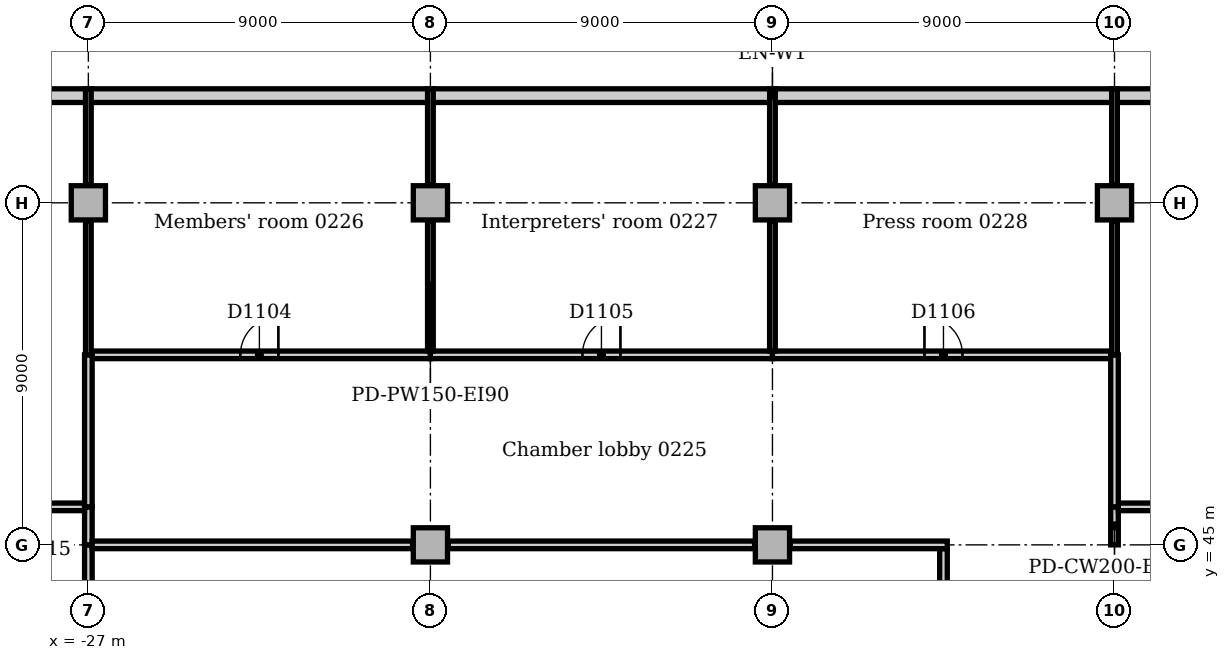
"""IFC4 building model, lengths in metres.
Left out: names, types, materials, properties, quantities, classifications, styles, units other than length and angle.
Written with IfcOpenShell. Run it as: python <this file> out.ifc"""

import sys

from ifc_helpers import new_model, si_unit, direction, frame, frame_2d, origin, origin_2d, place, context, subcontext, project, spatial, rectangle, extrude, element, fill, save


model = new_model("IFC4")
c1 = context("Model", 3, precision=1e-05, world=origin(), true_north=direction((0.0, 1.0)))
c2 = subcontext(c1, "Body", "Model", "MODEL_VIEW")
j1 = project(units=[si_unit("LENGTHUNIT", "METRE"), si_unit("PLANEANGLEUNIT", "RADIAN")], contexts=[c1])
p1 = place(None, origin())
s1 = spatial("IfcSite", under=j1, at=p1, CompositionType="ELEMENT")
p2 = place(p1, origin())
s2 = spatial("IfcBuilding", under=s1, at=p2, CompositionType="ELEMENT")
p3 = place(p2, frame((0.0, 0.0, 11.0)))
s3 = spatial("IfcBuildingStorey", under=s2, at=p3, CompositionType="ELEMENT", Elevation=11.0)
for number, where, z_axis, x_axis in (
    (1, (-27.0, 54.0, 0.0), (0.0, 0.0, 1.0), (1.0, 0.0, 0.0)),
    (2, (-18.0, 45.0, 0.0), (0.0, 0.0, 1.0), (1.0, 0.0, 0.0)),
    (3, (-18.0, 54.0, 0.0), (0.0, 0.0, 1.0), (1.0, 0.0, 0.0)),
    (4, (-9.0, 45.0, 0.0), (0.0, 0.0, 1.0), (1.0, 0.0, 0.0)),
    (5, (-9.0, 54.0, 0.0), (0.0, 0.0, 1.0), (1.0, 0.0, 0.0)),
    (6, (0.0, 54.0, 0.0), (0.0, 0.0, 1.0), (1.0, 0.0, 0.0)),
):
    element("IfcColumn", number, at=place(p3, frame(where, z_axis=z_axis, x_axis=x_axis)), inside=s3, PredefinedType="COLUMN", context=c2, shape_type="SweptSolid", body=[
        extrude(rectangle(XDim=0.9, YDim=0.9, at=origin_2d()), origin(), (0.0, 0.0, 1.0), 4.7),
    ])
p4 = place(p3, frame((63.0, 56.82, 0.0), z_axis=(0.0, 0.0, 1.0), x_axis=(-1.0, 0.0, 0.0)))
e7 = element("IfcWall", 7, at=p4, inside=s3, PredefinedType="STANDARD", context=c2, shape_type="SweptSolid", body=[
    extrude(rectangle(XDim=144.0, YDim=0.36, at=frame_2d((72.0, 0.0))), origin(), (0.0, 0.0, 1.0), 4.7),
])
p5 = place(p4, frame((2.85, 0.0, 0.9)))
e8 = element("IfcOpeningElement", 8, at=p5, cuts=e7, PredefinedType="OPENING", context=c2, shape_type="SweptSolid", body=[
    extrude(rectangle(XDim=3.3, YDim=2.4, at=frame_2d((1.65, 1.2))), frame((0.0, 0.19, 0.0), z_axis=(0.0, -1.0, 0.0), x_axis=(1.0, 0.0, 0.0)), (0.0, 0.0, 1.0), 0.38),
])
p6 = place(p4, frame((7.35, 0.0, 0.9)))
e9 = element("IfcOpeningElement", 9, at=p6, cuts=e7, PredefinedType="OPENING", context=c2, shape_type="SweptSolid", body=[
    extrude(rectangle(XDim=3.3, YDim=2.4, at=frame_2d((1.65, 1.2))), frame((0.0, 0.19, 0.0), z_axis=(0.0, -1.0, 0.0), x_axis=(1.0, 0.0, 0.0)), (0.0, 0.0, 1.0), 0.38),
])
p7 = place(p4, frame((11.85, 0.0, 0.9)))
e10 = element("IfcOpeningElement", 10, at=p7, cuts=e7, PredefinedType="OPENING", context=c2, shape_type="SweptSolid", body=[
    extrude(rectangle(XDim=3.3, YDim=2.4, at=frame_2d((1.65, 1.2))), frame((0.0, 0.19, 0.0), z_axis=(0.0, -1.0, 0.0), x_axis=(1.0, 0.0, 0.0)), (0.0, 0.0, 1.0), 0.38),
])
p8 = place(p4, frame((16.35, 0.0, 0.9)))
e11 = element("IfcOpeningElement", 11, at=p8, cuts=e7, PredefinedType="OPENING", context=c2, shape_type="SweptSolid", body=[
    extrude(rectangle(XDim=3.3, YDim=2.4, at=frame_2d((1.65, 1.2))), frame((0.0, 0.19, 0.0), z_axis=(0.0, -1.0, 0.0), x_axis=(1.0, 0.0, 0.0)), (0.0, 0.0, 1.0), 0.38),
])
p9 = place(p4, frame((20.85, 0.0, 0.9)))
e12 = element("IfcOpeningElement", 12, at=p9, cuts=e7, PredefinedType="OPENING", context=c2, shape_type="SweptSolid", body=[
    extrude(rectangle(XDim=3.3, YDim=2.4, at=frame_2d((1.65, 1.2))), frame((0.0, 0.19, 0.0), z_axis=(0.0, -1.0, 0.0), x_axis=(1.0, 0.0, 0.0)), (0.0, 0.0, 1.0), 0.38),
])
p10 = place(p4, frame((25.35, 0.0, 0.9)))
e13 = element("IfcOpeningElement", 13, at=p10, cuts=e7, PredefinedType="OPENING", context=c2, shape_type="SweptSolid", body=[
    extrude(rectangle(XDim=3.3, YDim=2.4, at=frame_2d((1.65, 1.2))), frame((0.0, 0.19, 0.0), z_axis=(0.0, -1.0, 0.0), x_axis=(1.0, 0.0, 0.0)), (0.0, 0.0, 1.0), 0.38),
])
p11 = place(p4, frame((29.85, 0.0, 0.9)))
e14 = element("IfcOpeningElement", 14, at=p11, cuts=e7, PredefinedType="OPENING", context=c2, shape_type="SweptSolid", body=[
    extrude(rectangle(XDim=3.3, YDim=2.4, at=frame_2d((1.65, 1.2))), frame((0.0, 0.19, 0.0), z_axis=(0.0, -1.0, 0.0), x_axis=(1.0, 0.0, 0.0)), (0.0, 0.0, 1.0), 0.38),
])
p12 = place(p4, frame((34.35, 0.0, 0.9)))
e15 = element("IfcOpeningElement", 15, at=p12, cuts=e7, PredefinedType="OPENING", context=c2, shape_type="SweptSolid", body=[
    extrude(rectangle(XDim=3.3, YDim=2.4, at=frame_2d((1.65, 1.2))), frame((0.0, 0.19, 0.0), z_axis=(0.0, -1.0, 0.0), x_axis=(1.0, 0.0, 0.0)), (0.0, 0.0, 1.0), 0.38),
])
p13 = place(p4, frame((38.85, 0.0, 0.9)))
e16 = element("IfcOpeningElement", 16, at=p13, cuts=e7, PredefinedType="OPENING", context=c2, shape_type="SweptSolid", body=[
    extrude(rectangle(XDim=3.3, YDim=2.4, at=frame_2d((1.65, 1.2))), frame((0.0, 0.19, 0.0), z_axis=(0.0, -1.0, 0.0), x_axis=(1.0, 0.0, 0.0)), (0.0, 0.0, 1.0), 0.38),
])
p14 = place(p4, frame((43.35, 0.0, 0.9)))
e17 = element("IfcOpeningElement", 17, at=p14, cuts=e7, PredefinedType="OPENING", context=c2, shape_type="SweptSolid", body=[
    extrude(rectangle(XDim=3.3, YDim=2.4, at=frame_2d((1.65, 1.2))), frame((0.0, 0.19, 0.0), z_axis=(0.0, -1.0, 0.0), x_axis=(1.0, 0.0, 0.0)), (0.0, 0.0, 1.0), 0.38),
])
p15 = place(p4, frame((47.85, 0.0, 0.9)))
e18 = element("IfcOpeningElement", 18, at=p15, cuts=e7, PredefinedType="OPENING", context=c2, shape_type="SweptSolid", body=[
    extrude(rectangle(XDim=3.3, YDim=2.4, at=frame_2d((1.65, 1.2))), frame((0.0, 0.19, 0.0), z_axis=(0.0, -1.0, 0.0), x_axis=(1.0, 0.0, 0.0)), (0.0, 0.0, 1.0), 0.38),
])
p16 = place(p4, frame((52.35, 0.0, 0.9)))
e19 = element("IfcOpeningElement", 19, at=p16, cuts=e7, PredefinedType="OPENING", context=c2, shape_type="SweptSolid", body=[
    extrude(rectangle(XDim=3.3, YDim=2.4, at=frame_2d((1.65, 1.2))), frame((0.0, 0.19, 0.0), z_axis=(0.0, -1.0, 0.0), x_axis=(1.0, 0.0, 0.0)), (0.0, 0.0, 1.0), 0.38),
])
p17 = place(p4, frame((56.85, 0.0, 0.9)))
e20 = element("IfcOpeningElement", 20, at=p17, cuts=e7, PredefinedType="OPENING", context=c2, shape_type="SweptSolid", body=[
    extrude(rectangle(XDim=3.3, YDim=2.4, at=frame_2d((1.65, 1.2))), frame((0.0, 0.19, 0.0), z_axis=(0.0, -1.0, 0.0), x_axis=(1.0, 0.0, 0.0)), (0.0, 0.0, 1.0), 0.38),
])
p18 = place(p4, frame((92.85, 0.0, 0.9)))
e21 = element("IfcOpeningElement", 21, at=p18, cuts=e7, PredefinedType="OPENING", context=c2, shape_type="SweptSolid", body=[
    extrude(rectangle(XDim=3.3, YDim=2.4, at=frame_2d((1.65, 1.2))), frame((0.0, 0.19, 0.0), z_axis=(0.0, -1.0, 0.0), x_axis=(1.0, 0.0, 0.0)), (0.0, 0.0, 1.0), 0.38),
])
p19 = place(p4, frame((97.35, 0.0, 0.9)))
e22 = element("IfcOpeningElement", 22, at=p19, cuts=e7, PredefinedType="OPENING", context=c2, shape_type="SweptSolid", body=[
    extrude(rectangle(XDim=3.3, YDim=2.4, at=frame_2d((1.65, 1.2))), frame((0.0, 0.19, 0.0), z_axis=(0.0, -1.0, 0.0), x_axis=(1.0, 0.0, 0.0)), (0.0, 0.0, 1.0), 0.38),
])
p20 = place(p4, frame((101.85, 0.0, 0.9)))
e23 = element("IfcOpeningElement", 23, at=p20, cuts=e7, PredefinedType="OPENING", context=c2, shape_type="SweptSolid", body=[
    extrude(rectangle(XDim=3.3, YDim=2.4, at=frame_2d((1.65, 1.2))), frame((0.0, 0.19, 0.0), z_axis=(0.0, -1.0, 0.0), x_axis=(1.0, 0.0, 0.0)), (0.0, 0.0, 1.0), 0.38),
])
p21 = place(p4, frame((106.35, 0.0, 0.9)))
e24 = element("IfcOpeningElement", 24, at=p21, cuts=e7, PredefinedType="OPENING", context=c2, shape_type="SweptSolid", body=[
    extrude(rectangle(XDim=3.3, YDim=2.4, at=frame_2d((1.65, 1.2))), frame((0.0, 0.19, 0.0), z_axis=(0.0, -1.0, 0.0), x_axis=(1.0, 0.0, 0.0)), (0.0, 0.0, 1.0), 0.38),
])
p22 = place(p4, frame((110.85, 0.0, 0.9)))
e25 = element("IfcOpeningElement", 25, at=p22, cuts=e7, PredefinedType="OPENING", context=c2, shape_type="SweptSolid", body=[
    extrude(rectangle(XDim=3.3, YDim=2.4, at=frame_2d((1.65, 1.2))), frame((0.0, 0.19, 0.0), z_axis=(0.0, -1.0, 0.0), x_axis=(1.0, 0.0, 0.0)), (0.0, 0.0, 1.0), 0.38),
])
p23 = place(p4, frame((115.35, 0.0, 0.9)))
e26 = element("IfcOpeningElement", 26, at=p23, cuts=e7, PredefinedType="OPENING", context=c2, shape_type="SweptSolid", body=[
    extrude(rectangle(XDim=3.3, YDim=2.4, at=frame_2d((1.65, 1.2))), frame((0.0, 0.19, 0.0), z_axis=(0.0, -1.0, 0.0), x_axis=(1.0, 0.0, 0.0)), (0.0, 0.0, 1.0), 0.38),
])
p24 = place(p4, frame((119.85, 0.0, 0.9)))
e27 = element("IfcOpeningElement", 27, at=p24, cuts=e7, PredefinedType="OPENING", context=c2, shape_type="SweptSolid", body=[
    extrude(rectangle(XDim=3.3, YDim=2.4, at=frame_2d((1.65, 1.2))), frame((0.0, 0.19, 0.0), z_axis=(0.0, -1.0, 0.0), x_axis=(1.0, 0.0, 0.0)), (0.0, 0.0, 1.0), 0.38),
])
p25 = place(p4, frame((124.35, 0.0, 0.9)))
e28 = element("IfcOpeningElement", 28, at=p25, cuts=e7, PredefinedType="OPENING", context=c2, shape_type="SweptSolid", body=[
    extrude(rectangle(XDim=3.3, YDim=2.4, at=frame_2d((1.65, 1.2))), frame((0.0, 0.19, 0.0), z_axis=(0.0, -1.0, 0.0), x_axis=(1.0, 0.0, 0.0)), (0.0, 0.0, 1.0), 0.38),
])
p26 = place(p4, frame((128.85, 0.0, 0.9)))
e29 = element("IfcOpeningElement", 29, at=p26, cuts=e7, PredefinedType="OPENING", context=c2, shape_type="SweptSolid", body=[
    extrude(rectangle(XDim=3.3, YDim=2.4, at=frame_2d((1.65, 1.2))), frame((0.0, 0.19, 0.0), z_axis=(0.0, -1.0, 0.0), x_axis=(1.0, 0.0, 0.0)), (0.0, 0.0, 1.0), 0.38),
])
p27 = place(p4, frame((133.35, 0.0, 0.9)))
e30 = element("IfcOpeningElement", 30, at=p27, cuts=e7, PredefinedType="OPENING", context=c2, shape_type="SweptSolid", body=[
    extrude(rectangle(XDim=3.3, YDim=2.4, at=frame_2d((1.65, 1.2))), frame((0.0, 0.19, 0.0), z_axis=(0.0, -1.0, 0.0), x_axis=(1.0, 0.0, 0.0)), (0.0, 0.0, 1.0), 0.38),
])
p28 = place(p4, frame((137.85, 0.0, 0.9)))
e31 = element("IfcOpeningElement", 31, at=p28, cuts=e7, PredefinedType="OPENING", context=c2, shape_type="SweptSolid", body=[
    extrude(rectangle(XDim=3.3, YDim=2.4, at=frame_2d((1.65, 1.2))), frame((0.0, 0.19, 0.0), z_axis=(0.0, -1.0, 0.0), x_axis=(1.0, 0.0, 0.0)), (0.0, 0.0, 1.0), 0.38),
])
p29 = place(p3, frame((-27.0, 42.0, 0.0), z_axis=(0.0, 0.0, 1.0), x_axis=(0.0, 1.0, 0.0)))
e32 = element("IfcWall", 32, at=p29, inside=s3, PredefinedType="PARTITIONING", context=c2, shape_type="SweptSolid", body=[
    extrude(rectangle(XDim=3.0, YDim=0.2, at=frame_2d((1.5, 0.0))), origin(), (0.0, 0.0, 1.0), 4.7),
])
p30 = place(p3, frame((-27.0, 45.0, 0.0), z_axis=(0.0, 0.0, 1.0), x_axis=(0.0, 1.0, 0.0)))
e33 = element("IfcWall", 33, at=p30, inside=s3, PredefinedType="PARTITIONING", context=c2, shape_type="SweptSolid", body=[
    extrude(rectangle(XDim=1.0, YDim=0.2, at=frame_2d((0.5, 0.0))), origin(), (0.0, 0.0, 1.0), 4.7),
])
p31 = place(p3, frame((-36.0, 46.0, 0.0), z_axis=(0.0, 0.0, 1.0), x_axis=(1.0, 0.0, 0.0)))
e34 = element("IfcWall", 34, at=p31, inside=s3, PredefinedType="PARTITIONING", context=c2, shape_type="SweptSolid", body=[
    extrude(rectangle(XDim=8.9, YDim=0.2, at=frame_2d((4.45, 0.0))), origin(), (0.0, 0.0, 1.0), 4.7),
])
p32 = place(p31, frame((4.0, 0.0, 0.0)))
e35 = element("IfcOpeningElement", 35, at=p32, cuts=e34, PredefinedType="OPENING", context=c2, shape_type="SweptSolid", body=[
    extrude(rectangle(XDim=1.0, YDim=2.1, at=frame_2d((0.5, 1.05))), frame((0.0, 0.11, 0.0), z_axis=(0.0, -1.0, 0.0), x_axis=(1.0, 0.0, 0.0)), (0.0, 0.0, 1.0), 0.22),
])
p33 = place(p3, frame((0.0, 45.0, 0.0), z_axis=(0.0, 0.0, 1.0), x_axis=(0.0, 1.0, 0.0)))
e36 = element("IfcWall", 36, at=p33, inside=s3, PredefinedType="PARTITIONING", context=c2, shape_type="SweptSolid", body=[
    extrude(rectangle(XDim=1.0, YDim=0.2, at=frame_2d((0.5, 0.0))), origin(), (0.0, 0.0, 1.0), 4.7),
])
p34 = place(p3, frame((0.1, 46.0, 0.0), z_axis=(0.0, 0.0, 1.0), x_axis=(1.0, 0.0, 0.0)))
e37 = element("IfcWall", 37, at=p34, inside=s3, PredefinedType="PARTITIONING", context=c2, shape_type="SweptSolid", body=[
    extrude(rectangle(XDim=8.9, YDim=0.2, at=frame_2d((4.45, 0.0))), origin(), (0.0, 0.0, 1.0), 4.7),
])
p35 = place(p34, frame((3.9, 0.0, 0.0)))
e38 = element("IfcOpeningElement", 38, at=p35, cuts=e37, PredefinedType="OPENING", context=c2, shape_type="SweptSolid", body=[
    extrude(rectangle(XDim=1.0, YDim=2.1, at=frame_2d((0.5, 1.05))), frame((0.0, 0.11, 0.0), z_axis=(0.0, -1.0, 0.0), x_axis=(1.0, 0.0, 0.0)), (0.0, 0.0, 1.0), 0.22),
])
p36 = place(p3, frame((-4.5, 21.0, 0.0), z_axis=(0.0, 0.0, 1.0), x_axis=(0.0, 1.0, 0.0)))
e39 = element("IfcWall", 39, at=p36, inside=s3, PredefinedType="PARTITIONING", context=c2, shape_type="SweptSolid", body=[
    extrude(rectangle(XDim=23.9, YDim=0.2, at=frame_2d((11.95, 0.0))), origin(), (0.0, 0.0, 1.0), 4.7),
])
p37 = place(p3, frame((-26.9, 45.0, 0.0), z_axis=(0.0, 0.0, 1.0), x_axis=(1.0, 0.0, 0.0)))
e40 = element("IfcWall", 40, at=p37, inside=s3, PredefinedType="PARTITIONING", context=c2, shape_type="SweptSolid", body=[
    extrude(rectangle(XDim=8.43, YDim=0.2, at=frame_2d((4.215, 0.0))), origin(), (0.0, 0.0, 1.0), 4.7),
])
p38 = place(p3, frame((-17.53, 45.0, 0.0), z_axis=(0.0, 0.0, 1.0), x_axis=(1.0, 0.0, 0.0)))
e41 = element("IfcWall", 41, at=p38, inside=s3, PredefinedType="PARTITIONING", context=c2, shape_type="SweptSolid", body=[
    extrude(rectangle(XDim=8.06, YDim=0.2, at=frame_2d((4.03, 0.0))), origin(), (0.0, 0.0, 1.0), 4.7),
])
p39 = place(p3, frame((-8.53, 45.0, 0.0), z_axis=(0.0, 0.0, 1.0), x_axis=(1.0, 0.0, 0.0)))
e42 = element("IfcWall", 42, at=p39, inside=s3, PredefinedType="PARTITIONING", context=c2, shape_type="SweptSolid", body=[
    extrude(rectangle(XDim=4.13, YDim=0.2, at=frame_2d((2.065, 0.0))), origin(), (0.0, 0.0, 1.0), 4.7),
])
p40 = place(p3, frame((-26.9, 50.0, 0.0), z_axis=(0.0, 0.0, 1.0), x_axis=(1.0, 0.0, 0.0)))
e43 = element("IfcWall", 43, at=p40, inside=s3, PredefinedType="PARTITIONING", context=c2, shape_type="SweptSolid", body=[
    extrude(rectangle(XDim=8.9, YDim=0.2, at=frame_2d((4.45, 0.0))), origin(), (0.0, 0.0, 1.0), 4.7),
])
p41 = place(p40, frame((3.9, 0.0, 0.0)))
e44 = element("IfcOpeningElement", 44, at=p41, cuts=e43, PredefinedType="OPENING", context=c2, shape_type="SweptSolid", body=[
    extrude(rectangle(XDim=1.0, YDim=2.1, at=frame_2d((0.5, 1.05))), frame((0.0, 0.11, 0.0), z_axis=(0.0, -1.0, 0.0), x_axis=(1.0, 0.0, 0.0)), (0.0, 0.0, 1.0), 0.22),
])
p42 = place(p3, frame((-18.0, 50.0, 0.0), z_axis=(0.0, 0.0, 1.0), x_axis=(1.0, 0.0, 0.0)))
e45 = element("IfcWall", 45, at=p42, inside=s3, PredefinedType="PARTITIONING", context=c2, shape_type="SweptSolid", body=[
    extrude(rectangle(XDim=9.0, YDim=0.2, at=frame_2d((4.5, 0.0))), origin(), (0.0, 0.0, 1.0), 4.7),
])
p43 = place(p42, frame((4.0, 0.0, 0.0)))
e46 = element("IfcOpeningElement", 46, at=p43, cuts=e45, PredefinedType="OPENING", context=c2, shape_type="SweptSolid", body=[
    extrude(rectangle(XDim=1.0, YDim=2.1, at=frame_2d((0.5, 1.05))), frame((0.0, 0.11, 0.0), z_axis=(0.0, -1.0, 0.0), x_axis=(1.0, 0.0, 0.0)), (0.0, 0.0, 1.0), 0.22),
])
p44 = place(p3, frame((-9.0, 50.0, 0.0), z_axis=(0.0, 0.0, 1.0), x_axis=(1.0, 0.0, 0.0)))
e47 = element("IfcWall", 47, at=p44, inside=s3, PredefinedType="PARTITIONING", context=c2, shape_type="SweptSolid", body=[
    extrude(rectangle(XDim=8.9, YDim=0.2, at=frame_2d((4.45, 0.0))), origin(), (0.0, 0.0, 1.0), 4.7),
])
p45 = place(p44, frame((4.0, 0.0, 0.0)))
e48 = element("IfcOpeningElement", 48, at=p45, cuts=e47, PredefinedType="OPENING", context=c2, shape_type="SweptSolid", body=[
    extrude(rectangle(XDim=1.0, YDim=2.1, at=frame_2d((0.5, 1.05))), frame((0.0, 0.11, 0.0), z_axis=(0.0, -1.0, 0.0), x_axis=(1.0, 0.0, 0.0)), (0.0, 0.0, 1.0), 0.22),
])
for number, where, z_axis, x_axis in (
    (49, (-27.0, 46.0, 0.0), (0.0, 0.0, 1.0), (0.0, 1.0, 0.0)),
    (50, (0.0, 46.0, 0.0), (0.0, 0.0, 1.0), (0.0, 1.0, 0.0)),
):
    element("IfcWall", number, at=place(p3, frame(where, z_axis=z_axis, x_axis=x_axis)), inside=s3, PredefinedType="PARTITIONING", context=c2, shape_type="SweptSolid", body=[
        extrude(rectangle(XDim=4.0, YDim=0.2, at=frame_2d((2.0, 0.0))), origin(), (0.0, 0.0, 1.0), 4.7),
    ])
p46 = place(p3, frame((-18.0, 50.1, 0.0), z_axis=(0.0, 0.0, 1.0), x_axis=(0.0, 1.0, 0.0)))
e51 = element("IfcWall", 51, at=p46, inside=s3, PredefinedType="PARTITIONING", context=c2, shape_type="SweptSolid", body=[
    extrude(rectangle(XDim=3.43, YDim=0.15, at=frame_2d((1.715, 0.0))), origin(), (0.0, 0.0, 1.0), 4.7),
])
p47 = place(p3, frame((-18.0, 54.47, 0.0), z_axis=(0.0, 0.0, 1.0), x_axis=(0.0, 1.0, 0.0)))
e52 = element("IfcWall", 52, at=p47, inside=s3, PredefinedType="PARTITIONING", context=c2, shape_type="SweptSolid", body=[
    extrude(rectangle(XDim=2.53, YDim=0.15, at=frame_2d((1.265, 0.0))), origin(), (0.0, 0.0, 1.0), 4.7),
])
p48 = place(p3, frame((-27.0, 50.0, 0.0), z_axis=(0.0, 0.0, 1.0), x_axis=(0.0, 1.0, 0.0)))
e53 = element("IfcWall", 53, at=p48, inside=s3, PredefinedType="PARTITIONING", context=c2, shape_type="SweptSolid", body=[
    extrude(rectangle(XDim=3.53, YDim=0.15, at=frame_2d((1.765, 0.0))), origin(), (0.0, 0.0, 1.0), 4.7),
])
p49 = place(p3, frame((-27.0, 54.47, 0.0), z_axis=(0.0, 0.0, 1.0), x_axis=(0.0, 1.0, 0.0)))
e54 = element("IfcWall", 54, at=p49, inside=s3, PredefinedType="PARTITIONING", context=c2, shape_type="SweptSolid", body=[
    extrude(rectangle(XDim=2.53, YDim=0.15, at=frame_2d((1.265, 0.0))), origin(), (0.0, 0.0, 1.0), 4.7),
])
p50 = place(p3, frame((-9.0, 50.1, 0.0), z_axis=(0.0, 0.0, 1.0), x_axis=(0.0, 1.0, 0.0)))
e55 = element("IfcWall", 55, at=p50, inside=s3, PredefinedType="PARTITIONING", context=c2, shape_type="SweptSolid", body=[
    extrude(rectangle(XDim=3.43, YDim=0.15, at=frame_2d((1.715, 0.0))), origin(), (0.0, 0.0, 1.0), 4.7),
])
p51 = place(p3, frame((-9.0, 54.47, 0.0), z_axis=(0.0, 0.0, 1.0), x_axis=(0.0, 1.0, 0.0)))
e56 = element("IfcWall", 56, at=p51, inside=s3, PredefinedType="PARTITIONING", context=c2, shape_type="SweptSolid", body=[
    extrude(rectangle(XDim=2.53, YDim=0.15, at=frame_2d((1.265, 0.0))), origin(), (0.0, 0.0, 1.0), 4.7),
])
p52 = place(p3, frame((0.0, 50.0, 0.0), z_axis=(0.0, 0.0, 1.0), x_axis=(0.0, 1.0, 0.0)))
e57 = element("IfcWall", 57, at=p52, inside=s3, PredefinedType="PARTITIONING", context=c2, shape_type="SweptSolid", body=[
    extrude(rectangle(XDim=3.53, YDim=0.15, at=frame_2d((1.765, 0.0))), origin(), (0.0, 0.0, 1.0), 4.7),
])
p53 = place(p3, frame((0.0, 54.47, 0.0), z_axis=(0.0, 0.0, 1.0), x_axis=(0.0, 1.0, 0.0)))
e58 = element("IfcWall", 58, at=p53, inside=s3, PredefinedType="PARTITIONING", context=c2, shape_type="SweptSolid", body=[
    extrude(rectangle(XDim=2.53, YDim=0.15, at=frame_2d((1.265, 0.0))), origin(), (0.0, 0.0, 1.0), 4.7),
])
p54 = place(p41, origin())
e59 = element("IfcDoor", 59, at=p54, inside=s3, OperationType="SINGLE_SWING_RIGHT", PredefinedType="DOOR", context=c2, shape_type="SweptSolid", body=[
    extrude(rectangle(XDim=1.0, YDim=2.1, at=frame_2d((0.5, 1.05))), frame((0.0, 0.025, 0.0), z_axis=(0.0, -1.0, 0.0), x_axis=(1.0, 0.0, 0.0)), (0.0, 0.0, 1.0), 0.05),
])
fill(e44, e59)
p55 = place(p43, origin())
e60 = element("IfcDoor", 60, at=p55, inside=s3, OperationType="SINGLE_SWING_RIGHT", PredefinedType="DOOR", context=c2, shape_type="SweptSolid", body=[
    extrude(rectangle(XDim=1.0, YDim=2.1, at=frame_2d((0.5, 1.05))), frame((0.0, 0.025, 0.0), z_axis=(0.0, -1.0, 0.0), x_axis=(1.0, 0.0, 0.0)), (0.0, 0.0, 1.0), 0.05),
])
fill(e46, e60)
p56 = place(p45, origin())
e61 = element("IfcDoor", 61, at=p56, inside=s3, OperationType="SINGLE_SWING_LEFT", PredefinedType="DOOR", context=c2, shape_type="SweptSolid", body=[
    extrude(rectangle(XDim=1.0, YDim=2.1, at=frame_2d((0.5, 1.05))), frame((0.0, 0.025, 0.0), z_axis=(0.0, -1.0, 0.0), x_axis=(1.0, 0.0, 0.0)), (0.0, 0.0, 1.0), 0.05),
])
fill(e48, e61)
save(model, sys.argv[1])
